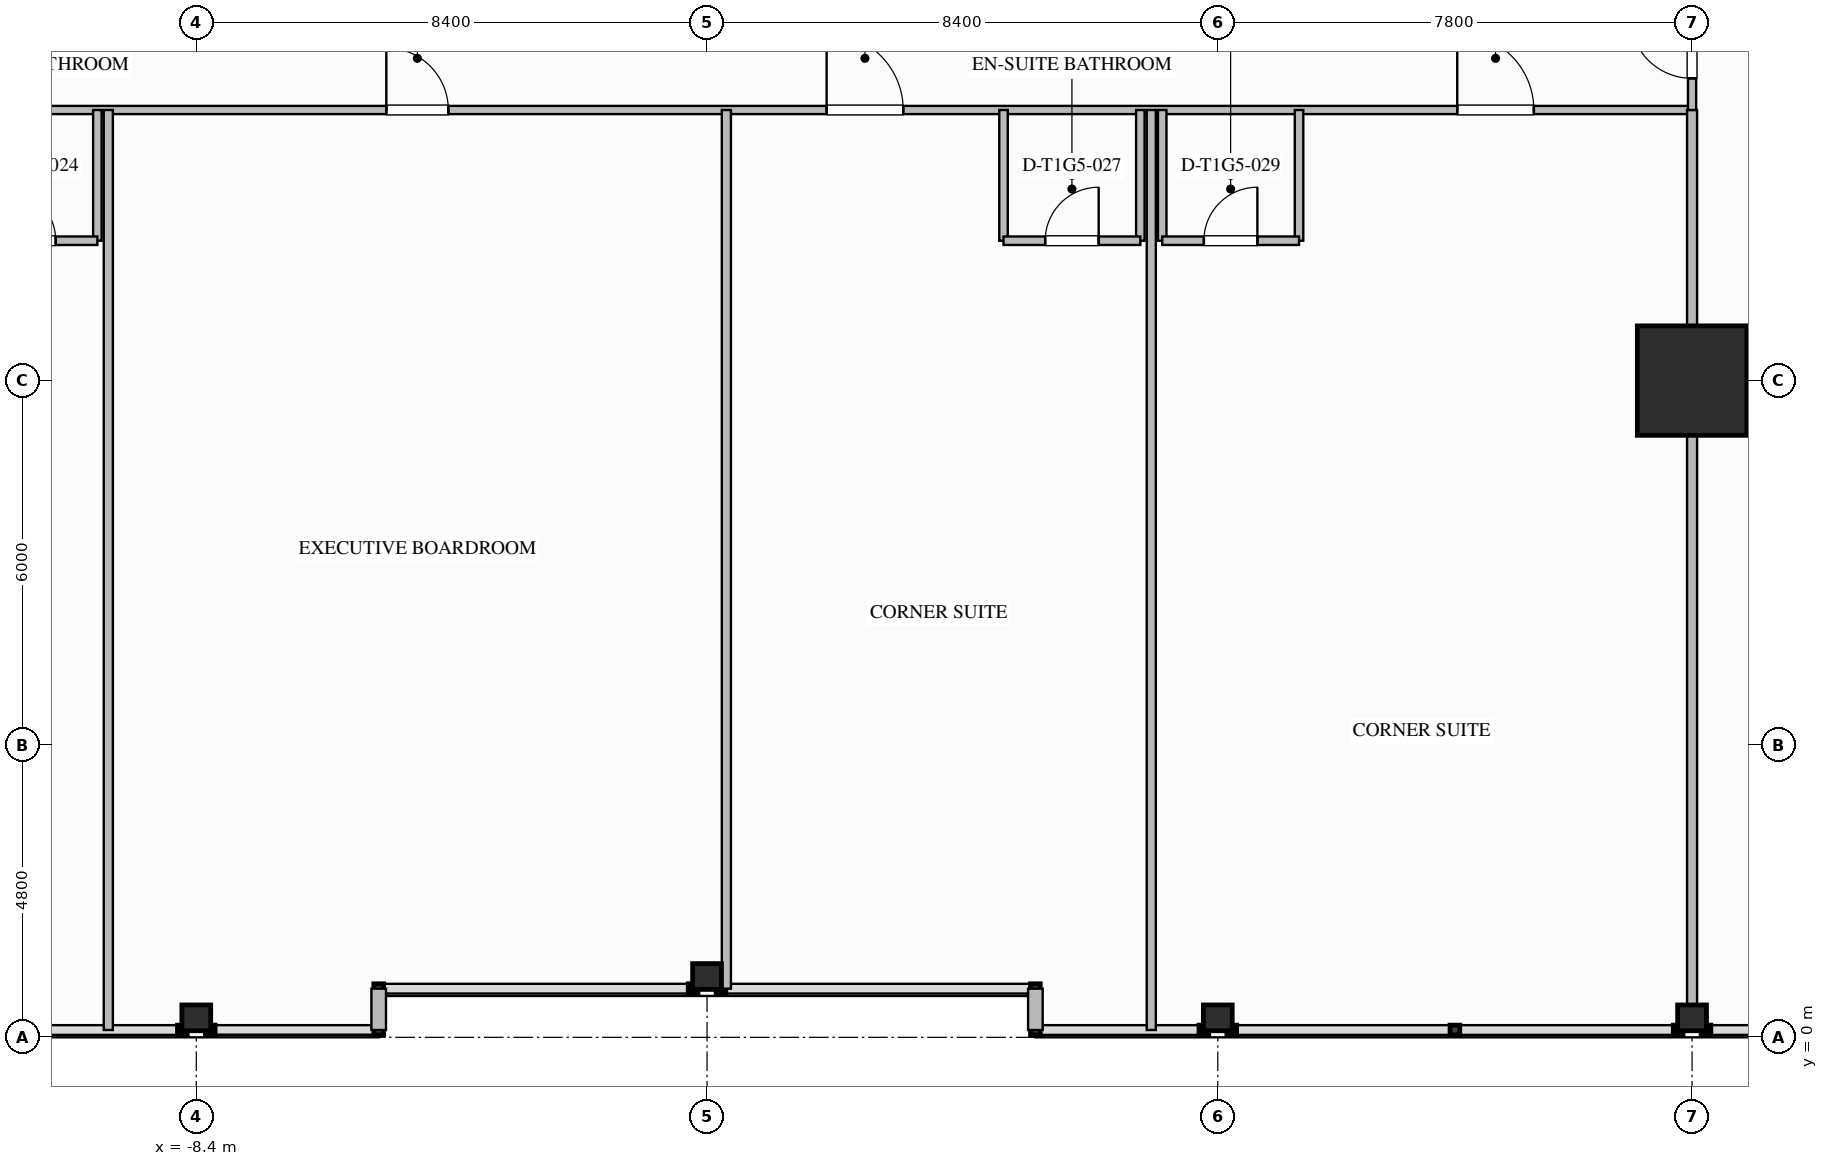
"""IFC4 building model, lengths in metres.
Left out: names, types, materials, properties, quantities, classifications, styles, units other than length and angle.
Written with IfcOpenShell. Run it as: python <this file> out.ifc"""

import sys

from ifc_helpers import new_model, si_unit, direction, frame, frame_2d, origin, origin_2d, place, context, subcontext, project, spatial, rectangle, i_section, extrude, element, fill, save


model = new_model("IFC4")
c1 = context("Model", 3, precision=1e-05, world=origin(), true_north=direction((0.0, 1.0)))
c2 = subcontext(c1, "Body", "Model", "MODEL_VIEW")
j1 = project(units=[si_unit("LENGTHUNIT", "METRE"), si_unit("PLANEANGLEUNIT", "RADIAN")], contexts=[c1])
p1 = place(None, origin())
s1 = spatial("IfcSite", under=j1, at=p1, CompositionType="ELEMENT")
p2 = place(p1, origin())
s2 = spatial("IfcBuilding", under=s1, at=p2, CompositionType="ELEMENT")
p3 = place(p2, frame((0.0, 0.0, 75.2)))
s3 = spatial("IfcBuildingStorey", under=s2, at=p3, CompositionType="ELEMENT", Elevation=75.2)
p4 = place(p3, frame((16.2, 10.8, 0.0), z_axis=(0.0, 0.0, 1.0), x_axis=(1.0, 0.0, 0.0)))
e1 = element("IfcColumn", 1, at=p4, inside=s3, PredefinedType="COLUMN", context=c2, shape_type="SweptSolid", body=[
    extrude(rectangle(XDim=1.8, YDim=1.8, at=origin_2d()), origin(), (0.0, 0.0, 1.0), 3.5),
])
for number, where, z_axis, x_axis in (
    (2, (-8.4, 0.32, 0.0), (0.0, 0.0, 1.0), (0.0, 1.0, 0.0)),
    (3, (0.0, 1.0, 0.0), (0.0, 0.0, 1.0), (0.0, 1.0, 0.0)),
    (4, (8.4, 0.32, 0.0), (0.0, 0.0, 1.0), (0.0, 1.0, 0.0)),
    (5, (16.2, 0.32, 0.0), (0.0, 0.0, 1.0), (0.0, 1.0, 0.0)),
):
    element("IfcColumn", number, at=place(p3, frame(where, z_axis=z_axis, x_axis=x_axis)), inside=s3, PredefinedType="COLUMN", context=c2, shape_type="SweptSolid", body=[
        extrude(i_section(OverallWidth=0.424, OverallDepth=0.474, WebThickness=0.048, FlangeThickness=0.077, FilletRadius=0.03, at=origin_2d()), origin(), (0.0, 0.0, 1.0), 3.497),
    ])
for number, where, z_axis, x_axis in (
    (6, (5.4, 0.12, 0.0), (0.0, 0.0, 1.0), (0.0, 1.0, 0.0)),
    (7, (-5.4, 0.8, 0.0), (0.0, 0.0, 1.0), (0.0, -1.0, 0.0)),
):
    element("IfcWall", number, at=place(p3, frame(where, z_axis=z_axis, x_axis=x_axis)), inside=s3, PredefinedType="STANDARD", context=c2, shape_type="SweptSolid", body=[
        extrude(rectangle(XDim=0.68, YDim=0.24, at=frame_2d((0.34, 0.0))), origin(), (0.0, 0.0, 1.0), 3.24),
    ])
p5 = place(p3, frame((-16.2, 15.25, 0.0), z_axis=(0.0, 0.0, 1.0), x_axis=(1.0, 0.0, 0.0)))
e8 = element("IfcWall", 8, at=p5, inside=s3, PredefinedType="PARTITIONING", context=c2, shape_type="SweptSolid", body=[
    extrude(rectangle(XDim=32.4, YDim=0.135, at=frame_2d((16.2, 0.0))), origin(), (0.0, 0.0, 1.0), 3.24),
])
p6 = place(p5, frame((1.331, 0.0, 0.0)))
e9 = element("IfcOpeningElement", 9, at=p6, cuts=e8, PredefinedType="OPENING", context=c2, shape_type="SweptSolid", body=[
    extrude(rectangle(XDim=1.26, YDim=2.2, at=frame_2d((0.63, 1.1))), frame((0.0, 0.077, 0.0), z_axis=(0.0, -1.0, 0.0), x_axis=(1.0, 0.0, 0.0)), (0.0, 0.0, 1.0), 0.155),
])
p7 = place(p5, frame((10.925, 0.0, 0.0)))
e10 = element("IfcOpeningElement", 10, at=p7, cuts=e8, PredefinedType="OPENING", context=c2, shape_type="SweptSolid", body=[
    extrude(rectangle(XDim=1.02, YDim=2.15, at=frame_2d((0.51, 1.075))), frame((0.0, 0.077, 0.0), z_axis=(0.0, -1.0, 0.0), x_axis=(1.0, 0.0, 0.0)), (0.0, 0.0, 1.0), 0.155),
])
p8 = place(p5, frame((18.167, 0.0, 0.0)))
e11 = element("IfcOpeningElement", 11, at=p8, cuts=e8, PredefinedType="OPENING", context=c2, shape_type="SweptSolid", body=[
    extrude(rectangle(XDim=1.26, YDim=2.2, at=frame_2d((0.63, 1.1))), frame((0.0, 0.077, 0.0), z_axis=(0.0, -1.0, 0.0), x_axis=(1.0, 0.0, 0.0)), (0.0, 0.0, 1.0), 0.155),
])
p9 = place(p5, frame((28.538, 0.0, 0.0)))
e12 = element("IfcOpeningElement", 12, at=p9, cuts=e8, PredefinedType="OPENING", context=c2, shape_type="SweptSolid", body=[
    extrude(rectangle(XDim=1.26, YDim=2.2, at=frame_2d((0.63, 1.1))), frame((0.0, 0.077, 0.0), z_axis=(0.0, -1.0, 0.0), x_axis=(1.0, 0.0, 0.0)), (0.0, 0.0, 1.0), 0.155),
])
p10 = place(p3, frame((16.2, 0.12, 0.0), z_axis=(0.0, 0.0, 1.0), x_axis=(0.0, 1.0, 0.0)))
e13 = element("IfcWall", 13, at=p10, inside=s3, PredefinedType="PARTITIONING", context=c2, shape_type="SweptSolid", body=[
    extrude(rectangle(XDim=15.13, YDim=0.165, at=frame_2d((7.565, 0.0))), origin(), (0.0, 0.0, 1.0), 2.452),
])
p11 = place(p3, frame((16.2, 15.25, 0.0), z_axis=(0.0, 0.0, 1.0), x_axis=(0.0, 1.0, 0.0)))
e14 = element("IfcWall", 14, at=p11, inside=s3, PredefinedType="PARTITIONING", context=c2, shape_type="SweptSolid", body=[
    extrude(rectangle(XDim=3.05, YDim=0.135, at=frame_2d((1.525, 0.0))), origin(), (0.0, 0.0, 1.0), 2.452),
])
p12 = place(p11, frame((0.52, 0.0, 0.0)))
e15 = element("IfcOpeningElement", 15, at=p12, cuts=e14, PredefinedType="OPENING", context=c2, shape_type="SweptSolid", body=[
    extrude(rectangle(XDim=1.02, YDim=2.15, at=frame_2d((0.51, 1.075))), frame((0.0, 0.077, 0.0), z_axis=(0.0, -1.0, 0.0), x_axis=(1.0, 0.0, 0.0)), (0.0, 0.0, 1.0), 0.155),
])
p13 = place(p3, frame((-10.027, 15.25, 0.0), z_axis=(0.0, 0.0, 1.0), x_axis=(0.0, -1.0, 0.0)))
e16 = element("IfcWall", 16, at=p13, inside=s3, PredefinedType="PLUMBINGWALL", context=c2, shape_type="SweptSolid", body=[
    extrude(rectangle(XDim=2.15, YDim=0.14, at=frame_2d((1.075, 0.0))), origin(), (0.0, 0.0, 1.0), 3.24),
])
p14 = place(p3, frame((-12.277, 13.1, 0.0), z_axis=(0.0, 0.0, 1.0), x_axis=(1.0, 0.0, 0.0)))
e17 = element("IfcWall", 17, at=p14, inside=s3, PredefinedType="PLUMBINGWALL", context=c2, shape_type="SweptSolid", body=[
    extrude(rectangle(XDim=2.25, YDim=0.14, at=frame_2d((1.125, 0.0))), origin(), (0.0, 0.0, 1.0), 3.24),
])
p15 = place(p14, frame((0.685, 0.0, 0.0)))
e18 = element("IfcOpeningElement", 18, at=p15, cuts=e17, PredefinedType="OPENING", context=c2, shape_type="SweptSolid", body=[
    extrude(rectangle(XDim=0.88, YDim=2.1, at=frame_2d((0.44, 1.05))), frame((0.0, 0.08, 0.0), z_axis=(0.0, -1.0, 0.0), x_axis=(1.0, 0.0, 0.0)), (0.0, 0.0, 1.0), 0.16),
])
p16 = place(p3, frame((-9.847, 0.12, 0.0), z_axis=(0.0, 0.0, 1.0), x_axis=(0.0, 1.0, 0.0)))
e19 = element("IfcWall", 19, at=p16, inside=s3, PredefinedType="PARTITIONING", context=c2, shape_type="SweptSolid", body=[
    extrude(rectangle(XDim=15.13, YDim=0.15, at=frame_2d((7.565, 0.0))), origin(), (0.0, 0.0, 1.0), 3.24),
])
p17 = place(p3, frame((0.318, 0.8, 0.0), z_axis=(0.0, 0.0, 1.0), x_axis=(0.0, 1.0, 0.0)))
e20 = element("IfcWall", 20, at=p17, inside=s3, PredefinedType="PARTITIONING", context=c2, shape_type="SweptSolid", body=[
    extrude(rectangle(XDim=14.45, YDim=0.15, at=frame_2d((7.225, 0.0))), origin(), (0.0, 0.0, 1.0), 2.452),
])
for number, where, z_axis, x_axis in (
    (21, (4.876, 15.25, 0.0), (0.0, 0.0, 1.0), (0.0, -1.0, 0.0)),
    (22, (7.126, 15.25, 0.0), (0.0, 0.0, 1.0), (0.0, -1.0, 0.0)),
):
    element("IfcWall", number, at=place(p3, frame(where, z_axis=z_axis, x_axis=x_axis)), inside=s3, PredefinedType="PLUMBINGWALL", context=c2, shape_type="SweptSolid", body=[
        extrude(rectangle(XDim=2.15, YDim=0.14, at=frame_2d((1.075, 0.0))), origin(), (0.0, 0.0, 1.0), 3.24),
    ])
p18 = place(p3, frame((4.876, 13.1, 0.0), z_axis=(0.0, 0.0, 1.0), x_axis=(1.0, 0.0, 0.0)))
e23 = element("IfcWall", 23, at=p18, inside=s3, PredefinedType="PLUMBINGWALL", context=c2, shape_type="SweptSolid", body=[
    extrude(rectangle(XDim=2.25, YDim=0.14, at=frame_2d((1.125, 0.0))), origin(), (0.0, 0.0, 1.0), 3.24),
])
p19 = place(p18, frame((0.685, 0.0, 0.0)))
e24 = element("IfcOpeningElement", 24, at=p19, cuts=e23, PredefinedType="OPENING", context=c2, shape_type="SweptSolid", body=[
    extrude(rectangle(XDim=0.88, YDim=2.1, at=frame_2d((0.44, 1.05))), frame((0.0, 0.08, 0.0), z_axis=(0.0, -1.0, 0.0), x_axis=(1.0, 0.0, 0.0)), (0.0, 0.0, 1.0), 0.16),
])
p20 = place(p3, frame((7.306, 0.12, 0.0), z_axis=(0.0, 0.0, 1.0), x_axis=(0.0, 1.0, 0.0)))
e25 = element("IfcWall", 25, at=p20, inside=s3, PredefinedType="PARTITIONING", context=c2, shape_type="SweptSolid", body=[
    extrude(rectangle(XDim=15.13, YDim=0.15, at=frame_2d((7.565, 0.0))), origin(), (0.0, 0.0, 1.0), 3.24),
])
for number, where, z_axis, x_axis in (
    (26, (7.486, 15.25, 0.0), (0.0, 0.0, 1.0), (0.0, -1.0, 0.0)),
    (27, (9.736, 15.25, 0.0), (0.0, 0.0, 1.0), (0.0, -1.0, 0.0)),
):
    element("IfcWall", number, at=place(p3, frame(where, z_axis=z_axis, x_axis=x_axis)), inside=s3, PredefinedType="PLUMBINGWALL", context=c2, shape_type="SweptSolid", body=[
        extrude(rectangle(XDim=2.15, YDim=0.14, at=frame_2d((1.075, 0.0))), origin(), (0.0, 0.0, 1.0), 3.24),
    ])
p21 = place(p3, frame((7.486, 13.1, 0.0), z_axis=(0.0, 0.0, 1.0), x_axis=(1.0, 0.0, 0.0)))
e28 = element("IfcWall", 28, at=p21, inside=s3, PredefinedType="PLUMBINGWALL", context=c2, shape_type="SweptSolid", body=[
    extrude(rectangle(XDim=2.25, YDim=0.14, at=frame_2d((1.125, 0.0))), origin(), (0.0, 0.0, 1.0), 3.24),
])
p22 = place(p21, frame((0.685, 0.0, 0.0)))
e29 = element("IfcOpeningElement", 29, at=p22, cuts=e28, PredefinedType="OPENING", context=c2, shape_type="SweptSolid", body=[
    extrude(rectangle(XDim=0.88, YDim=2.1, at=frame_2d((0.44, 1.05))), frame((0.0, 0.08, 0.0), z_axis=(0.0, -1.0, 0.0), x_axis=(1.0, 0.0, 0.0)), (0.0, 0.0, 1.0), 0.16),
])
p23 = place(p12, origin())
e30 = element("IfcDoor", 30, at=p23, inside=s3, OperationType="SINGLE_SWING_RIGHT", PredefinedType="DOOR", context=c2, shape_type="SweptSolid", body=[
    extrude(rectangle(XDim=1.02, YDim=2.15, at=frame_2d((0.51, 1.075))), frame((0.0, 0.025, 0.0), z_axis=(0.0, -1.0, 0.0), x_axis=(1.0, 0.0, 0.0)), (0.0, 0.0, 1.0), 0.05),
])
fill(e15, e30)
p24 = place(p15, origin())
e31 = element("IfcDoor", 31, at=p24, inside=s3, OperationType="SINGLE_SWING_LEFT", PredefinedType="DOOR", context=c2, shape_type="SweptSolid", body=[
    extrude(rectangle(XDim=0.88, YDim=2.1, at=frame_2d((0.44, 1.05))), frame((0.0, 0.025, 0.0), z_axis=(0.0, -1.0, 0.0), x_axis=(1.0, 0.0, 0.0)), (0.0, 0.0, 1.0), 0.05),
])
fill(e18, e31)
p25 = place(p7, origin())
e32 = element("IfcDoor", 32, at=p25, inside=s3, OperationType="SINGLE_SWING_LEFT", PredefinedType="DOOR", context=c2, shape_type="SweptSolid", body=[
    extrude(rectangle(XDim=1.02, YDim=2.15, at=frame_2d((0.51, 1.075))), frame((0.0, 0.025, 0.0), z_axis=(0.0, -1.0, 0.0), x_axis=(1.0, 0.0, 0.0)), (0.0, 0.0, 1.0), 0.05),
])
fill(e10, e32)
p26 = place(p19, origin())
e33 = element("IfcDoor", 33, at=p26, inside=s3, OperationType="SINGLE_SWING_RIGHT", PredefinedType="DOOR", context=c2, shape_type="SweptSolid", body=[
    extrude(rectangle(XDim=0.88, YDim=2.1, at=frame_2d((0.44, 1.05))), frame((0.0, 0.025, 0.0), z_axis=(0.0, -1.0, 0.0), x_axis=(1.0, 0.0, 0.0)), (0.0, 0.0, 1.0), 0.05),
])
fill(e24, e33)
p27 = place(p8, origin())
e34 = element("IfcDoor", 34, at=p27, inside=s3, OperationType="SINGLE_SWING_LEFT", PredefinedType="DOOR", context=c2, shape_type="SweptSolid", body=[
    extrude(rectangle(XDim=1.26, YDim=2.2, at=frame_2d((0.63, 1.1))), frame((0.0, 0.025, 0.0), z_axis=(0.0, -1.0, 0.0), x_axis=(1.0, 0.0, 0.0)), (0.0, 0.0, 1.0), 0.05),
])
fill(e11, e34)
p28 = place(p22, origin())
e35 = element("IfcDoor", 35, at=p28, inside=s3, OperationType="SINGLE_SWING_RIGHT", PredefinedType="DOOR", context=c2, shape_type="SweptSolid", body=[
    extrude(rectangle(XDim=0.88, YDim=2.1, at=frame_2d((0.44, 1.05))), frame((0.0, 0.025, 0.0), z_axis=(0.0, -1.0, 0.0), x_axis=(1.0, 0.0, 0.0)), (0.0, 0.0, 1.0), 0.05),
])
fill(e29, e35)
p29 = place(p9, origin())
e36 = element("IfcDoor", 36, at=p29, inside=s3, OperationType="SINGLE_SWING_LEFT", PredefinedType="DOOR", context=c2, shape_type="SweptSolid", body=[
    extrude(rectangle(XDim=1.26, YDim=2.2, at=frame_2d((0.63, 1.1))), frame((0.0, 0.025, 0.0), z_axis=(0.0, -1.0, 0.0), x_axis=(1.0, 0.0, 0.0)), (0.0, 0.0, 1.0), 0.05),
])
fill(e12, e36)
save(model, sys.argv[1])
